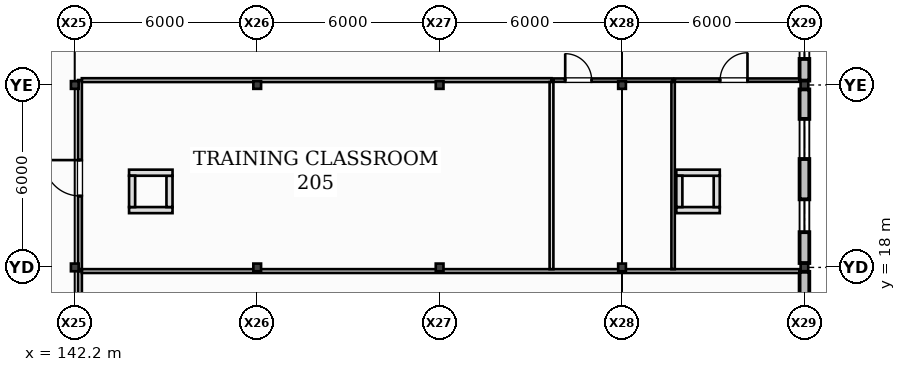
"""IFC4 building model, lengths in metres.
Left out: names, types, materials, properties, quantities, classifications, styles, units other than length and angle.
Written with IfcOpenShell. Run it as: python <this file> out.ifc"""

import sys

from ifc_helpers import new_model, si_unit, direction, frame, frame_2d, origin, origin_2d, place, context, subcontext, project, spatial, rectangle, hollow_rectangle, i_section, extrude, element, fill, save


model = new_model("IFC4")
c1 = context("Model", 3, precision=1e-05, world=origin(), true_north=direction((0.0, 1.0)))
c2 = subcontext(c1, "Body", "Model", "MODEL_VIEW")
j1 = project(units=[si_unit("LENGTHUNIT", "METRE"), si_unit("PLANEANGLEUNIT", "RADIAN")], contexts=[c1])
p1 = place(None, origin())
s1 = spatial("IfcSite", under=j1, at=p1, CompositionType="ELEMENT")
p2 = place(p1, origin())
s2 = spatial("IfcBuilding", under=s1, at=p2, CompositionType="ELEMENT")
p3 = place(p2, frame((0.0, 0.0, 6.0)))
s3 = spatial("IfcBuildingStorey", under=s2, at=p3, CompositionType="ELEMENT", Elevation=6.0)
for number, where, z_axis, x_axis in (
    (1, (142.2, 18.0, 0.0), (0.0, 0.0, 1.0), (1.0, 0.0, 0.0)),
    (2, (142.2, 24.0, 0.0), (0.0, 0.0, 1.0), (1.0, 0.0, 0.0)),
    (3, (148.2, 18.0, 0.0), (0.0, 0.0, 1.0), (1.0, 0.0, 0.0)),
    (4, (148.2, 24.0, 0.0), (0.0, 0.0, 1.0), (1.0, 0.0, 0.0)),
    (5, (154.2, 18.0, 0.0), (0.0, 0.0, 1.0), (1.0, 0.0, 0.0)),
    (6, (154.2, 24.0, 0.0), (0.0, 0.0, 1.0), (1.0, 0.0, 0.0)),
    (7, (160.2, 18.0, 0.0), (0.0, 0.0, 1.0), (1.0, 0.0, 0.0)),
    (8, (160.2, 24.0, 0.0), (0.0, 0.0, 1.0), (1.0, 0.0, 0.0)),
):
    element("IfcColumn", number, at=place(p3, frame(where, z_axis=z_axis, x_axis=x_axis)), inside=s3, PredefinedType="COLUMN", context=c2, shape_type="SweptSolid", body=[
        extrude(i_section(OverallWidth=0.254, OverallDepth=0.253, WebThickness=0.009, FlangeThickness=0.014, at=origin_2d()), origin(), (0.0, 0.0, 1.0), 4.0),
    ])
p4 = place(p3, frame((166.2, 18.0, 0.0), z_axis=(0.0, 0.0, 1.0), x_axis=(1.0, 0.0, 0.0)))
e9 = element("IfcColumn", 9, at=p4, inside=s3, PredefinedType="COLUMN", context=c2, shape_type="SweptSolid", body=[
    extrude(hollow_rectangle(XDim=0.25, YDim=0.25, WallThickness=0.012, at=origin_2d()), origin(), (0.0, 0.0, 1.0), 4.0),
])
p5 = place(p3, frame((166.2, 24.0, 0.0), z_axis=(0.0, 0.0, 1.0), x_axis=(1.0, 0.0, 0.0)))
e10 = element("IfcColumn", 10, at=p5, inside=s3, PredefinedType="COLUMN", context=c2, shape_type="SweptSolid", body=[
    extrude(i_section(OverallWidth=0.254, OverallDepth=0.253, WebThickness=0.009, FlangeThickness=0.014, at=origin_2d()), origin(), (0.0, 0.0, 1.0), 4.0),
])
p6 = place(p3, frame((166.2, 13.945, 0.0), z_axis=(0.0, 0.0, 1.0), x_axis=(0.0, 1.0, 0.0)))
e11 = element("IfcWall", 11, at=p6, inside=s3, PredefinedType="STANDARD", context=c2, shape_type="SweptSolid", body=[
    extrude(rectangle(XDim=3.91, YDim=0.32, at=frame_2d((1.955, 0.0))), origin(), (0.0, 0.0, 1.0), 4.0),
])
p7 = place(p6, frame((0.51, 0.0, 1.18)))
e12 = element("IfcOpeningElement", 12, at=p7, cuts=e11, PredefinedType="OPENING", context=c2, shape_type="SweptSolid", body=[
    extrude(rectangle(XDim=1.02, YDim=1.02, at=frame_2d((0.51, 0.51))), frame((0.0, 0.17, 0.0), z_axis=(0.0, -1.0, 0.0), x_axis=(1.0, 0.0, 0.0)), (0.0, 0.0, 1.0), 0.34),
])
p8 = place(p3, frame((166.2, 18.145, 0.0), z_axis=(0.0, 0.0, 1.0), x_axis=(0.0, 1.0, 0.0)))
e13 = element("IfcWall", 13, at=p8, inside=s3, PredefinedType="STANDARD", context=c2, shape_type="SweptSolid", body=[
    extrude(rectangle(XDim=5.71, YDim=0.32, at=frame_2d((2.855, 0.0))), origin(), (0.0, 0.0, 1.0), 3.157),
])
p9 = place(p8, frame((1.014, 0.0, 1.42)))
e14 = element("IfcOpeningElement", 14, at=p9, cuts=e13, PredefinedType="OPENING", context=c2, shape_type="SweptSolid", body=[
    extrude(rectangle(XDim=1.08, YDim=1.08, at=frame_2d((0.54, 0.54))), frame((0.0, 0.17, 0.0), z_axis=(0.0, -1.0, 0.0), x_axis=(1.0, 0.0, 0.0)), (0.0, 0.0, 1.0), 0.34),
])
p10 = place(p8, frame((3.42, 0.0, 1.28)))
e15 = element("IfcOpeningElement", 15, at=p10, cuts=e13, PredefinedType="OPENING", context=c2, shape_type="SweptSolid", body=[
    extrude(rectangle(XDim=1.32, YDim=1.32, at=frame_2d((0.66, 0.66))), frame((0.0, 0.17, 0.0), z_axis=(0.0, -1.0, 0.0), x_axis=(1.0, 0.0, 0.0)), (0.0, 0.0, 1.0), 0.34),
])
p11 = place(p3, frame((166.2, 24.145, 0.0), z_axis=(0.0, 0.0, 1.0), x_axis=(0.0, 1.0, 0.0)))
e16 = element("IfcWall", 16, at=p11, inside=s3, PredefinedType="STANDARD", context=c2, shape_type="SweptSolid", body=[
    extrude(rectangle(XDim=5.71, YDim=0.32, at=frame_2d((2.855, 0.0))), origin(), (0.0, 0.0, 1.0), 3.157),
])
p12 = place(p11, frame((0.712, 0.0, 0.96)))
e17 = element("IfcOpeningElement", 17, at=p12, cuts=e16, PredefinedType="OPENING", context=c2, shape_type="SweptSolid", body=[
    extrude(rectangle(XDim=1.2, YDim=1.2, at=frame_2d((0.6, 0.6))), frame((0.0, 0.17, 0.0), z_axis=(0.0, -1.0, 0.0), x_axis=(1.0, 0.0, 0.0)), (0.0, 0.0, 1.0), 0.34),
])
p13 = place(p11, frame((3.582, 0.0, 0.86)))
e18 = element("IfcOpeningElement", 18, at=p13, cuts=e16, PredefinedType="OPENING", context=c2, shape_type="SweptSolid", body=[
    extrude(rectangle(XDim=1.44, YDim=1.44, at=frame_2d((0.72, 0.72))), frame((0.0, 0.17, 0.0), z_axis=(0.0, -1.0, 0.0), x_axis=(1.0, 0.0, 0.0)), (0.0, 0.0, 1.0), 0.34),
])
p14 = place(p3, frame((143.985, 19.885, 0.0), z_axis=(0.0, 0.0, 1.0), x_axis=(1.0, 0.0, 0.0)))
e19 = element("IfcWall", 19, at=p14, inside=s3, PredefinedType="PARTITIONING", context=c2, shape_type="SweptSolid", body=[
    extrude(rectangle(XDim=1.43, YDim=0.2, at=frame_2d((0.715, 0.0))), origin(), (0.0, 0.0, 1.0), 3.72),
])
p15 = place(p3, frame((145.315, 19.985, 0.0), z_axis=(0.0, 0.0, 1.0), x_axis=(0.0, 1.0, 0.0)))
e20 = element("IfcWall", 20, at=p15, inside=s3, PredefinedType="PARTITIONING", context=c2, shape_type="SweptSolid", body=[
    extrude(rectangle(XDim=1.03, YDim=0.2, at=frame_2d((0.515, 0.0))), origin(), (0.0, 0.0, 1.0), 3.72),
])
p16 = place(p3, frame((145.415, 21.115, 0.0), z_axis=(0.0, 0.0, 1.0), x_axis=(-1.0, 0.0, 0.0)))
e21 = element("IfcWall", 21, at=p16, inside=s3, PredefinedType="PARTITIONING", context=c2, shape_type="SweptSolid", body=[
    extrude(rectangle(XDim=1.43, YDim=0.2, at=frame_2d((0.715, 0.0))), origin(), (0.0, 0.0, 1.0), 3.72),
])
p17 = place(p3, frame((144.085, 21.015, 0.0), z_axis=(0.0, 0.0, 1.0), x_axis=(0.0, -1.0, 0.0)))
e22 = element("IfcWall", 22, at=p17, inside=s3, PredefinedType="PARTITIONING", context=c2, shape_type="SweptSolid", body=[
    extrude(rectangle(XDim=1.03, YDim=0.2, at=frame_2d((0.515, 0.0))), origin(), (0.0, 0.0, 1.0), 3.379),
])
p18 = place(p3, frame((161.985, 19.885, 0.0), z_axis=(0.0, 0.0, 1.0), x_axis=(1.0, 0.0, 0.0)))
e23 = element("IfcWall", 23, at=p18, inside=s3, PredefinedType="PARTITIONING", context=c2, shape_type="SweptSolid", body=[
    extrude(rectangle(XDim=1.43, YDim=0.2, at=frame_2d((0.715, 0.0))), origin(), (0.0, 0.0, 1.0), 3.72),
])
p19 = place(p3, frame((163.315, 19.985, 0.0), z_axis=(0.0, 0.0, 1.0), x_axis=(0.0, 1.0, 0.0)))
e24 = element("IfcWall", 24, at=p19, inside=s3, PredefinedType="PARTITIONING", context=c2, shape_type="SweptSolid", body=[
    extrude(rectangle(XDim=1.03, YDim=0.2, at=frame_2d((0.515, 0.0))), origin(), (0.0, 0.0, 1.0), 3.72),
])
p20 = place(p3, frame((163.415, 21.115, 0.0), z_axis=(0.0, 0.0, 1.0), x_axis=(-1.0, 0.0, 0.0)))
e25 = element("IfcWall", 25, at=p20, inside=s3, PredefinedType="PARTITIONING", context=c2, shape_type="SweptSolid", body=[
    extrude(rectangle(XDim=1.43, YDim=0.2, at=frame_2d((0.715, 0.0))), origin(), (0.0, 0.0, 1.0), 3.72),
])
p21 = place(p3, frame((162.085, 21.015, 0.0), z_axis=(0.0, 0.0, 1.0), x_axis=(0.0, -1.0, 0.0)))
e26 = element("IfcWall", 26, at=p21, inside=s3, PredefinedType="PARTITIONING", context=c2, shape_type="SweptSolid", body=[
    extrude(rectangle(XDim=1.03, YDim=0.2, at=frame_2d((0.515, 0.0))), origin(), (0.0, 0.0, 1.0), 3.43),
])
p22 = place(p3, frame((142.37, 1.96, 0.0), z_axis=(0.0, 0.0, 1.0), x_axis=(0.0, 1.0, 0.0)))
e27 = element("IfcWall", 27, at=p22, inside=s3, PredefinedType="PARTITIONING", context=c2, shape_type="SweptSolid", body=[
    extrude(rectangle(XDim=15.923, YDim=0.125, at=frame_2d((7.961, 0.0))), origin(), (0.0, 0.0, 1.0), 3.72),
])
p23 = place(p22, frame((7.282, 0.0, 0.0)))
e28 = element("IfcOpeningElement", 28, at=p23, cuts=e27, PredefinedType="OPENING", context=c2, shape_type="SweptSolid", body=[
    extrude(rectangle(XDim=1.58, YDim=2.2, at=frame_2d((0.79, 1.1))), frame((0.0, 0.073, 0.0), z_axis=(0.0, -1.0, 0.0), x_axis=(1.0, 0.0, 0.0)), (0.0, 0.0, 1.0), 0.145),
])
p24 = place(p3, frame((142.433, 17.88, 0.0), z_axis=(0.0, 0.0, 1.0), x_axis=(1.0, 0.0, 0.0)))
e29 = element("IfcWall", 29, at=p24, inside=s3, PredefinedType="PARTITIONING", context=c2, shape_type="SweptSolid", body=[
    extrude(rectangle(XDim=23.607, YDim=0.125, at=frame_2d((11.804, 0.0))), origin(), (0.0, 0.0, 1.0), 3.153),
])
p25 = place(p3, frame((142.37, 17.942, 0.0), z_axis=(0.0, 0.0, 1.0), x_axis=(0.0, 1.0, 0.0)))
e30 = element("IfcWall", 30, at=p25, inside=s3, PredefinedType="PARTITIONING", context=c2, shape_type="SweptSolid", body=[
    extrude(rectangle(XDim=6.22, YDim=0.125, at=frame_2d((3.11, 0.0))), origin(), (0.0, 0.0, 1.0), 3.157),
])
p26 = place(p25, frame((2.408, 0.0, 0.0)))
e31 = element("IfcOpeningElement", 31, at=p26, cuts=e30, PredefinedType="OPENING", context=c2, shape_type="SweptSolid", body=[
    extrude(rectangle(XDim=1.18, YDim=2.16, at=frame_2d((0.59, 1.08))), frame((0.0, 0.073, 0.0), z_axis=(0.0, -1.0, 0.0), x_axis=(1.0, 0.0, 0.0)), (0.0, 0.0, 1.0), 0.145),
])
p27 = place(p3, frame((142.433, 24.16, 0.0), z_axis=(0.0, 0.0, 1.0), x_axis=(1.0, 0.0, 0.0)))
e32 = element("IfcWall", 32, at=p27, inside=s3, PredefinedType="PARTITIONING", context=c2, shape_type="SweptSolid", body=[
    extrude(rectangle(XDim=15.45, YDim=0.125, at=frame_2d((7.725, 0.0))), origin(), (0.0, 0.0, 1.0), 3.153),
])
p28 = place(p3, frame((157.88, 24.097, 0.0), z_axis=(0.0, 0.0, 1.0), x_axis=(0.0, -1.0, 0.0)))
e33 = element("IfcWall", 33, at=p28, inside=s3, PredefinedType="PARTITIONING", context=c2, shape_type="SweptSolid", body=[
    extrude(rectangle(XDim=6.155, YDim=0.125, at=frame_2d((3.078, 0.0))), origin(), (0.0, 0.0, 1.0), 3.379),
])
p29 = place(p3, frame((157.942, 24.16, 0.0), z_axis=(0.0, 0.0, 1.0), x_axis=(1.0, 0.0, 0.0)))
e34 = element("IfcWall", 34, at=p29, inside=s3, PredefinedType="PARTITIONING", context=c2, shape_type="SweptSolid", body=[
    extrude(rectangle(XDim=3.933, YDim=0.11, at=frame_2d((1.966, 0.0))), origin(), (0.0, 0.0, 1.0), 3.153),
])
p30 = place(p29, frame((0.388, 0.0, 0.0)))
e35 = element("IfcOpeningElement", 35, at=p30, cuts=e34, PredefinedType="OPENING", context=c2, shape_type="SweptSolid", body=[
    extrude(rectangle(XDim=0.87, YDim=2.06, at=frame_2d((0.435, 1.03))), frame((0.0, 0.065, 0.0), z_axis=(0.0, -1.0, 0.0), x_axis=(1.0, 0.0, 0.0)), (0.0, 0.0, 1.0), 0.13),
])
p31 = place(p3, frame((161.88, 24.105, 0.0), z_axis=(0.0, 0.0, 1.0), x_axis=(0.0, -1.0, 0.0)))
e36 = element("IfcWall", 36, at=p31, inside=s3, PredefinedType="PARTITIONING", context=c2, shape_type="SweptSolid", body=[
    extrude(rectangle(XDim=6.163, YDim=0.11, at=frame_2d((3.081, 0.0))), origin(), (0.0, 0.0, 1.0), 3.43),
])
p32 = place(p3, frame((161.935, 24.16, 0.0), z_axis=(0.0, 0.0, 1.0), x_axis=(1.0, 0.0, 0.0)))
e37 = element("IfcWall", 37, at=p32, inside=s3, PredefinedType="PARTITIONING", context=c2, shape_type="SweptSolid", body=[
    extrude(rectangle(XDim=4.105, YDim=0.11, at=frame_2d((2.052, 0.0))), origin(), (0.0, 0.0, 1.0), 3.153),
])
p33 = place(p32, frame((1.491, 0.0, 0.0)))
e38 = element("IfcOpeningElement", 38, at=p33, cuts=e37, PredefinedType="OPENING", context=c2, shape_type="SweptSolid", body=[
    extrude(rectangle(XDim=0.9, YDim=2.1, at=frame_2d((0.45, 1.05))), frame((0.0, 0.065, 0.0), z_axis=(0.0, -1.0, 0.0), x_axis=(1.0, 0.0, 0.0)), (0.0, 0.0, 1.0), 0.13),
])
p34 = place(p9, origin())
e39 = element("IfcWindow", 39, at=p34, inside=s3, PartitioningType="SINGLE_PANEL", PredefinedType="WINDOW", context=c2, shape_type="SweptSolid", body=[
    extrude(rectangle(XDim=1.08, YDim=1.08, at=frame_2d((0.54, 0.54))), frame((0.0, 0.03, 0.0), z_axis=(0.0, -1.0, 0.0), x_axis=(1.0, 0.0, 0.0)), (0.0, 0.0, 1.0), 0.06),
])
fill(e14, e39)
p35 = place(p10, origin())
e40 = element("IfcWindow", 40, at=p35, inside=s3, PartitioningType="SINGLE_PANEL", PredefinedType="WINDOW", context=c2, shape_type="SweptSolid", body=[
    extrude(rectangle(XDim=1.32, YDim=1.32, at=frame_2d((0.66, 0.66))), frame((0.0, 0.03, 0.0), z_axis=(0.0, -1.0, 0.0), x_axis=(1.0, 0.0, 0.0)), (0.0, 0.0, 1.0), 0.06),
])
fill(e15, e40)
p36 = place(p12, origin())
e41 = element("IfcWindow", 41, at=p36, inside=s3, PartitioningType="SINGLE_PANEL", PredefinedType="WINDOW", context=c2, shape_type="SweptSolid", body=[
    extrude(rectangle(XDim=1.2, YDim=1.2, at=frame_2d((0.6, 0.6))), frame((0.0, 0.03, 0.0), z_axis=(0.0, -1.0, 0.0), x_axis=(1.0, 0.0, 0.0)), (0.0, 0.0, 1.0), 0.06),
])
fill(e17, e41)
p37 = place(p26, frame((1.18, 0.0, 0.0), z_axis=(0.0, 0.0, 1.0), x_axis=(-1.0, 0.0, 0.0)))
e42 = element("IfcDoor", 42, at=p37, inside=s3, OperationType="SINGLE_SWING_RIGHT", PredefinedType="DOOR", context=c2, shape_type="SweptSolid", body=[
    extrude(rectangle(XDim=1.18, YDim=2.16, at=frame_2d((0.59, 1.08))), frame((0.0, 0.025, 0.0), z_axis=(0.0, -1.0, 0.0), x_axis=(1.0, 0.0, 0.0)), (0.0, 0.0, 1.0), 0.05),
])
fill(e31, e42)
p38 = place(p30, frame((0.87, 0.0, 0.0), z_axis=(0.0, 0.0, 1.0), x_axis=(-1.0, 0.0, 0.0)))
e43 = element("IfcDoor", 43, at=p38, inside=s3, OperationType="SINGLE_SWING_LEFT", PredefinedType="DOOR", context=c2, shape_type="SweptSolid", body=[
    extrude(rectangle(XDim=0.87, YDim=2.06, at=frame_2d((0.435, 1.03))), frame((0.0, 0.025, 0.0), z_axis=(0.0, -1.0, 0.0), x_axis=(1.0, 0.0, 0.0)), (0.0, 0.0, 1.0), 0.05),
])
fill(e35, e43)
p39 = place(p33, frame((0.9, 0.0, 0.0), z_axis=(0.0, 0.0, 1.0), x_axis=(-1.0, 0.0, 0.0)))
e44 = element("IfcDoor", 44, at=p39, inside=s3, OperationType="SINGLE_SWING_RIGHT", PredefinedType="DOOR", context=c2, shape_type="SweptSolid", body=[
    extrude(rectangle(XDim=0.9, YDim=2.1, at=frame_2d((0.45, 1.05))), frame((0.0, 0.025, 0.0), z_axis=(0.0, -1.0, 0.0), x_axis=(1.0, 0.0, 0.0)), (0.0, 0.0, 1.0), 0.05),
])
fill(e38, e44)
save(model, sys.argv[1])
